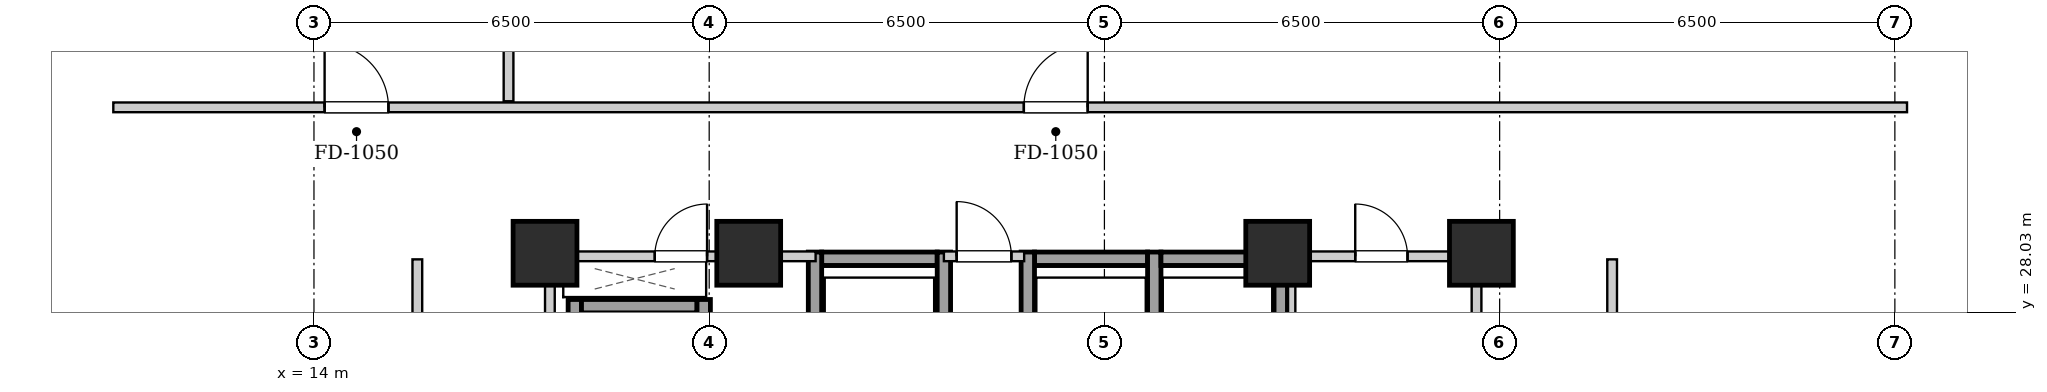
"""IFC4 building model, lengths in metres.
Left out: names, types, materials, properties, quantities, classifications, styles, units other than length and angle.
Written with IfcOpenShell. Run it as: python <this file> out.ifc"""

import sys

from ifc_helpers import new_model, si_unit, direction, frame, frame_2d, origin, origin_2d, place, context, subcontext, project, spatial, rectangle, extrude, element, fill, save


model = new_model("IFC4")
c1 = context("Model", 3, precision=1e-05, world=origin(), true_north=direction((0.0, 1.0)))
c2 = subcontext(c1, "Body", "Model", "MODEL_VIEW")
j1 = project(units=[si_unit("LENGTHUNIT", "METRE"), si_unit("PLANEANGLEUNIT", "RADIAN")], contexts=[c1])
p1 = place(None, origin())
s1 = spatial("IfcSite", under=j1, at=p1, CompositionType="ELEMENT")
p2 = place(p1, origin())
s2 = spatial("IfcBuilding", under=s1, at=p2, CompositionType="ELEMENT")
p3 = place(p2, frame((0.0, 0.0, 119.9)))
s3 = spatial("IfcBuildingStorey", under=s2, at=p3, CompositionType="ELEMENT", Elevation=119.9)
for number, where, z_axis, x_axis in (
    (1, (17.8, 29.0, 0.0), (0.0, 0.0, 1.0), (1.0, 0.0, 0.0)),
    (2, (21.15, 29.0, 0.0), (0.0, 0.0, 1.0), (1.0, 0.0, 0.0)),
    (3, (29.85, 29.0, 0.0), (0.0, 0.0, 1.0), (1.0, 0.0, 0.0)),
    (4, (33.2, 29.0, 0.0), (0.0, 0.0, 1.0), (1.0, 0.0, 0.0)),
):
    element("IfcColumn", number, at=place(p3, frame(where, z_axis=z_axis, x_axis=x_axis)), inside=s3, PredefinedType="COLUMN", context=c2, shape_type="SweptSolid", body=[
        extrude(rectangle(XDim=1.05, YDim=1.05, at=origin_2d()), origin(), (0.0, 0.0, 1.0), 4.5),
    ])
p4 = place(p3, frame((22.35, 28.91, 0.0), z_axis=(0.0, 0.0, 1.0), x_axis=(1.0, 0.0, 0.0)))
e5 = element("IfcWall", 5, at=p4, inside=s3, PredefinedType="SHEAR", context=c2, shape_type="SweptSolid", body=[
    extrude(rectangle(XDim=1.9, YDim=0.22, at=frame_2d((0.95, 0.0))), origin(), (0.0, 0.0, 1.0), 4.18),
])
for number, where, z_axis, x_axis in (
    (6, (22.24, 26.58, 0.0), (0.0, 0.0, 1.0), (0.0, 1.0, 0.0)),
    (7, (24.36, 26.58, 0.0), (0.0, 0.0, 1.0), (0.0, 1.0, 0.0)),
):
    element("IfcWall", number, at=place(p3, frame(where, z_axis=z_axis, x_axis=x_axis)), inside=s3, PredefinedType="SHEAR", context=c2, shape_type="SweptSolid", body=[
        extrude(rectangle(XDim=2.44, YDim=0.22, at=frame_2d((1.22, 0.0))), origin(), (0.0, 0.0, 1.0), 4.18),
    ])
p5 = place(p3, frame((25.85, 28.91, 0.0), z_axis=(0.0, 0.0, 1.0), x_axis=(1.0, 0.0, 0.0)))
e8 = element("IfcWall", 8, at=p5, inside=s3, PredefinedType="SHEAR", context=c2, shape_type="SweptSolid", body=[
    extrude(rectangle(XDim=1.86, YDim=0.22, at=frame_2d((0.93, 0.0))), origin(), (0.0, 0.0, 1.0), 4.18),
])
for number, where, z_axis, x_axis in (
    (9, (25.74, 26.58, 0.0), (0.0, 0.0, 1.0), (0.0, 1.0, 0.0)),
    (10, (27.82, 26.58, 0.0), (0.0, 0.0, 1.0), (0.0, 1.0, 0.0)),
):
    element("IfcWall", number, at=place(p3, frame(where, z_axis=z_axis, x_axis=x_axis)), inside=s3, PredefinedType="SHEAR", context=c2, shape_type="SweptSolid", body=[
        extrude(rectangle(XDim=2.44, YDim=0.22, at=frame_2d((1.22, 0.0))), origin(), (0.0, 0.0, 1.0), 4.18),
    ])
p6 = place(p3, frame((27.93, 28.91, 0.0), z_axis=(0.0, 0.0, 1.0), x_axis=(1.0, 0.0, 0.0)))
e11 = element("IfcWall", 11, at=p6, inside=s3, PredefinedType="SHEAR", context=c2, shape_type="SweptSolid", body=[
    extrude(rectangle(XDim=1.86, YDim=0.22, at=frame_2d((0.93, 0.0))), origin(), (0.0, 0.0, 1.0), 4.18),
])
p7 = place(p3, frame((29.9, 26.58, 0.0), z_axis=(0.0, 0.0, 1.0), x_axis=(0.0, 1.0, 0.0)))
e12 = element("IfcWall", 12, at=p7, inside=s3, PredefinedType="SHEAR", context=c2, shape_type="SweptSolid", body=[
    extrude(rectangle(XDim=2.44, YDim=0.22, at=frame_2d((1.22, 0.0))), origin(), (0.0, 0.0, 1.0), 4.18),
])
p8 = place(p3, frame((18.29, 24.1, 0.0), z_axis=(0.0, 0.0, 1.0), x_axis=(0.0, 1.0, 0.0)))
e13 = element("IfcWall", 13, at=p8, inside=s3, PredefinedType="SHEAR", context=c2, shape_type="SweptSolid", body=[
    extrude(rectangle(XDim=4.14, YDim=0.22, at=frame_2d((2.07, 0.0))), origin(), (0.0, 0.0, 1.0), 4.18),
])
p9 = place(p3, frame((18.4, 28.13, 0.0), z_axis=(0.0, 0.0, 1.0), x_axis=(1.0, 0.0, 0.0)))
e14 = element("IfcWall", 14, at=p9, inside=s3, PredefinedType="SHEAR", context=c2, shape_type="SweptSolid", body=[
    extrude(rectangle(XDim=1.9, YDim=0.22, at=frame_2d((0.95, 0.0))), origin(), (0.0, 0.0, 1.0), 4.18),
])
p10 = place(p3, frame((20.41, 26.06, 0.0), z_axis=(0.0, 0.0, 1.0), x_axis=(0.0, 1.0, 0.0)))
e15 = element("IfcWall", 15, at=p10, inside=s3, PredefinedType="SHEAR", context=c2, shape_type="SweptSolid", body=[
    extrude(rectangle(XDim=2.18, YDim=0.22, at=frame_2d((1.09, 0.0))), origin(), (0.0, 0.0, 1.0), 4.18),
])
for number, where, z_axis, x_axis in (
    (16, (17.88, 24.12, 0.0), (0.0, 0.0, 1.0), (0.0, 1.0, 0.0)),
    (17, (33.12, 24.12, 0.0), (0.0, 0.0, 1.0), (0.0, 1.0, 0.0)),
):
    element("IfcWall", number, at=place(p3, frame(where, z_axis=z_axis, x_axis=x_axis)), inside=s3, PredefinedType="PARTITIONING", context=c2, shape_type="SweptSolid", body=[
        extrude(rectangle(XDim=4.76, YDim=0.16, at=frame_2d((2.38, 0.0))), origin(), (0.0, 0.0, 1.0), 4.18),
    ])
p11 = place(p3, frame((24.36, 28.95, 0.0), z_axis=(0.0, 0.0, 1.0), x_axis=(1.0, 0.0, 0.0)))
e18 = element("IfcWall", 18, at=p11, inside=s3, PredefinedType="PARTITIONING", context=c2, shape_type="SweptSolid", body=[
    extrude(rectangle(XDim=1.32, YDim=0.16, at=frame_2d((0.66, 0.0))), origin(), (0.0, 0.0, 1.0), 4.18),
])
p12 = place(p11, frame((0.21, 0.0, 0.0)))
e19 = element("IfcOpeningElement", 19, at=p12, cuts=e18, PredefinedType="OPENING", context=c2, shape_type="SweptSolid", body=[
    extrude(rectangle(XDim=0.9, YDim=2.05, at=frame_2d((0.45, 1.025))), frame((0.0, 0.09, 0.0), z_axis=(0.0, -1.0, 0.0), x_axis=(1.0, 0.0, 0.0)), (0.0, 0.0, 1.0), 0.18),
])
p13 = place(p3, frame((17.96, 28.95, 0.0), z_axis=(0.0, 0.0, 1.0), x_axis=(1.0, 0.0, 0.0)))
e20 = element("IfcWall", 20, at=p13, inside=s3, PredefinedType="PARTITIONING", context=c2, shape_type="SweptSolid", body=[
    extrude(rectangle(XDim=4.29, YDim=0.16, at=frame_2d((2.145, 0.0))), origin(), (0.0, 0.0, 1.0), 4.18),
])
p14 = place(p13, frame((1.645, 0.0, 0.0)))
e21 = element("IfcOpeningElement", 21, at=p14, cuts=e20, PredefinedType="OPENING", context=c2, shape_type="SweptSolid", body=[
    extrude(rectangle(XDim=0.86, YDim=2.05, at=frame_2d((0.43, 1.025))), frame((0.0, 0.09, 0.0), z_axis=(0.0, -1.0, 0.0), x_axis=(1.0, 0.0, 0.0)), (0.0, 0.0, 1.0), 0.18),
])
p15 = place(p3, frame((30.08, 26.18, 0.0), z_axis=(0.0, 0.0, 1.0), x_axis=(0.0, 1.0, 0.0)))
e22 = element("IfcWall", 22, at=p15, inside=s3, PredefinedType="PARTITIONING", context=c2, shape_type="SweptSolid", body=[
    extrude(rectangle(XDim=2.68, YDim=0.12, at=frame_2d((1.34, 0.0))), origin(), (0.0, 0.0, 1.0), 4.18),
])
p16 = place(p3, frame((30.08, 28.95, 0.0), z_axis=(0.0, 0.0, 1.0), x_axis=(1.0, 0.0, 0.0)))
e23 = element("IfcWall", 23, at=p16, inside=s3, PredefinedType="PARTITIONING", context=c2, shape_type="SweptSolid", body=[
    extrude(rectangle(XDim=2.96, YDim=0.16, at=frame_2d((1.48, 0.0))), origin(), (0.0, 0.0, 1.0), 4.18),
])
p17 = place(p16, frame((1.045, 0.0, 0.0)))
e24 = element("IfcOpeningElement", 24, at=p17, cuts=e23, PredefinedType="OPENING", context=c2, shape_type="SweptSolid", body=[
    extrude(rectangle(XDim=0.86, YDim=2.05, at=frame_2d((0.43, 1.025))), frame((0.0, 0.09, 0.0), z_axis=(0.0, -1.0, 0.0), x_axis=(1.0, 0.0, 0.0)), (0.0, 0.0, 1.0), 0.18),
])
p18 = place(p3, frame((10.7, 31.4, 0.0), z_axis=(0.0, 0.0, 1.0), x_axis=(1.0, 0.0, 0.0)))
e25 = element("IfcWall", 25, at=p18, inside=s3, PredefinedType="PARTITIONING", context=c2, shape_type="SweptSolid", body=[
    extrude(rectangle(XDim=29.5, YDim=0.16, at=frame_2d((14.75, 0.0))), origin(), (0.0, 0.0, 1.0), 4.18),
])
p19 = place(p18, frame((3.475, 0.0, 0.0)))
e26 = element("IfcOpeningElement", 26, at=p19, cuts=e25, PredefinedType="OPENING", context=c2, shape_type="SweptSolid", body=[
    extrude(rectangle(XDim=1.05, YDim=2.05, at=frame_2d((0.525, 1.025))), frame((0.0, 0.09, 0.0), z_axis=(0.0, -1.0, 0.0), x_axis=(1.0, 0.0, 0.0)), (0.0, 0.0, 1.0), 0.18),
])
p20 = place(p18, frame((14.975, 0.0, 0.0)))
e27 = element("IfcOpeningElement", 27, at=p20, cuts=e25, PredefinedType="OPENING", context=c2, shape_type="SweptSolid", body=[
    extrude(rectangle(XDim=1.05, YDim=2.05, at=frame_2d((0.525, 1.025))), frame((0.0, 0.09, 0.0), z_axis=(0.0, -1.0, 0.0), x_axis=(1.0, 0.0, 0.0)), (0.0, 0.0, 1.0), 0.18),
])
p21 = place(p3, frame((17.2, 31.5, 0.0), z_axis=(0.0, 0.0, 1.0), x_axis=(0.0, 1.0, 0.0)))
e28 = element("IfcWall", 28, at=p21, inside=s3, PredefinedType="PARTITIONING", context=c2, shape_type="SweptSolid", body=[
    extrude(rectangle(XDim=11.0, YDim=0.16, at=frame_2d((5.5, 0.0))), origin(), (0.0, 0.0, 1.0), 1.965),
])
p22 = place(p3, frame((15.7, 15.1, 0.0), z_axis=(0.0, 0.0, 1.0), x_axis=(0.0, 1.0, 0.0)))
e29 = element("IfcWall", 29, at=p22, inside=s3, PredefinedType="PARTITIONING", context=c2, shape_type="SweptSolid", body=[
    extrude(rectangle(XDim=13.8, YDim=0.16, at=frame_2d((6.9, 0.0))), origin(), (0.0, 0.0, 1.0), 4.18),
])
p23 = place(p22, frame((6.475, 0.0, 0.0)))
e30 = element("IfcOpeningElement", 30, at=p23, cuts=e29, PredefinedType="OPENING", context=c2, shape_type="SweptSolid", body=[
    extrude(rectangle(XDim=1.05, YDim=2.05, at=frame_2d((0.525, 1.025))), frame((0.0, 0.09, 0.0), z_axis=(0.0, -1.0, 0.0), x_axis=(1.0, 0.0, 0.0)), (0.0, 0.0, 1.0), 0.18),
])
p24 = place(p3, frame((35.35, 15.1, 0.0), z_axis=(0.0, 0.0, 1.0), x_axis=(0.0, 1.0, 0.0)))
e31 = element("IfcWall", 31, at=p24, inside=s3, PredefinedType="PARTITIONING", context=c2, shape_type="SweptSolid", body=[
    extrude(rectangle(XDim=13.8, YDim=0.16, at=frame_2d((6.9, 0.0))), origin(), (0.0, 0.0, 1.0), 4.18),
])
p25 = place(p24, frame((6.475, 0.0, 0.0)))
e32 = element("IfcOpeningElement", 32, at=p25, cuts=e31, PredefinedType="OPENING", context=c2, shape_type="SweptSolid", body=[
    extrude(rectangle(XDim=1.05, YDim=2.05, at=frame_2d((0.525, 1.025))), frame((0.0, 0.09, 0.0), z_axis=(0.0, -1.0, 0.0), x_axis=(1.0, 0.0, 0.0)), (0.0, 0.0, 1.0), 0.18),
])
p26 = place(p12, origin())
e33 = element("IfcDoor", 33, at=p26, inside=s3, OperationType="SINGLE_SWING_LEFT", PredefinedType="DOOR", context=c2, shape_type="SweptSolid", body=[
    extrude(rectangle(XDim=0.9, YDim=2.05, at=frame_2d((0.45, 1.025))), frame((0.0, 0.025, 0.0), z_axis=(0.0, -1.0, 0.0), x_axis=(1.0, 0.0, 0.0)), (0.0, 0.0, 1.0), 0.05),
])
fill(e19, e33)
p27 = place(p14, origin())
e34 = element("IfcDoor", 34, at=p27, inside=s3, OperationType="SINGLE_SWING_RIGHT", PredefinedType="DOOR", context=c2, shape_type="SweptSolid", body=[
    extrude(rectangle(XDim=0.86, YDim=2.05, at=frame_2d((0.43, 1.025))), frame((0.0, 0.025, 0.0), z_axis=(0.0, -1.0, 0.0), x_axis=(1.0, 0.0, 0.0)), (0.0, 0.0, 1.0), 0.05),
])
fill(e21, e34)
p28 = place(p17, origin())
e35 = element("IfcDoor", 35, at=p28, inside=s3, OperationType="SINGLE_SWING_LEFT", PredefinedType="DOOR", context=c2, shape_type="SweptSolid", body=[
    extrude(rectangle(XDim=0.86, YDim=2.05, at=frame_2d((0.43, 1.025))), frame((0.0, 0.025, 0.0), z_axis=(0.0, -1.0, 0.0), x_axis=(1.0, 0.0, 0.0)), (0.0, 0.0, 1.0), 0.05),
])
fill(e24, e35)
p29 = place(p19, origin())
e36 = element("IfcDoor", 36, at=p29, inside=s3, OperationType="SINGLE_SWING_LEFT", PredefinedType="DOOR", context=c2, shape_type="SweptSolid", body=[
    extrude(rectangle(XDim=1.05, YDim=2.05, at=frame_2d((0.525, 1.025))), frame((0.0, 0.025, 0.0), z_axis=(0.0, -1.0, 0.0), x_axis=(1.0, 0.0, 0.0)), (0.0, 0.0, 1.0), 0.05),
])
fill(e26, e36)
p30 = place(p20, origin())
e37 = element("IfcDoor", 37, at=p30, inside=s3, OperationType="SINGLE_SWING_RIGHT", PredefinedType="DOOR", context=c2, shape_type="SweptSolid", body=[
    extrude(rectangle(XDim=1.05, YDim=2.05, at=frame_2d((0.525, 1.025))), frame((0.0, 0.025, 0.0), z_axis=(0.0, -1.0, 0.0), x_axis=(1.0, 0.0, 0.0)), (0.0, 0.0, 1.0), 0.05),
])
fill(e27, e37)
save(model, sys.argv[1])
